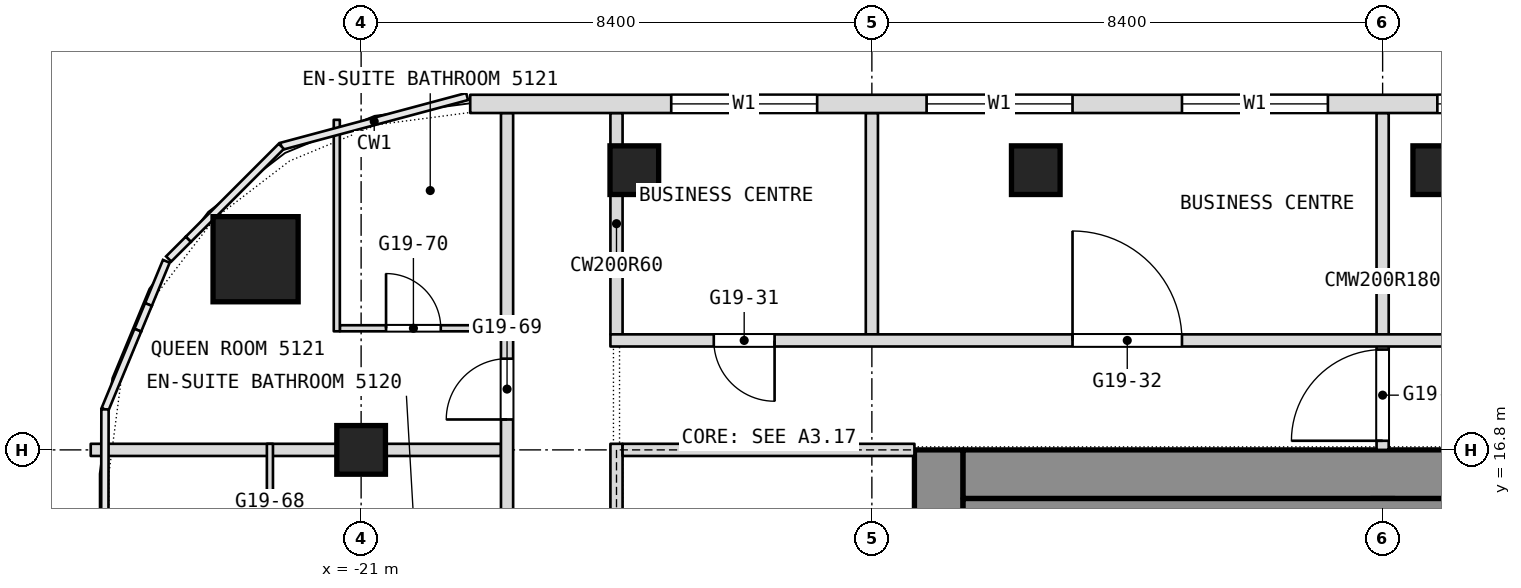
"""IFC4 building model, lengths in metres.
Left out: names, types, materials, properties, quantities, classifications, styles, units other than length and angle.
Written with IfcOpenShell. Run it as: python <this file> out.ifc"""

import sys

from ifc_helpers import new_model, si_unit, direction, frame, frame_2d, origin, origin_2d, place, context, subcontext, project, spatial, rectangle, extrude, element, fill, save


model = new_model("IFC4")
c1 = context("Model", 3, precision=1e-05, world=origin(), true_north=direction((0.0, 1.0)))
c2 = subcontext(c1, "Body", "Model", "MODEL_VIEW")
j1 = project(units=[si_unit("LENGTHUNIT", "METRE"), si_unit("PLANEANGLEUNIT", "RADIAN")], contexts=[c1])
p1 = place(None, origin())
s1 = spatial("IfcSite", under=j1, at=p1, CompositionType="ELEMENT")
p2 = place(p1, origin())
s2 = spatial("IfcBuilding", under=s1, at=p2, CompositionType="ELEMENT")
p3 = place(p2, frame((0.0, 0.0, 220.1)))
s3 = spatial("IfcBuildingStorey", under=s2, at=p3, CompositionType="ELEMENT", Elevation=220.1)
p4 = place(p3, frame((-11.5, 0.0, 0.0), z_axis=(0.0, 0.0, 1.0), x_axis=(0.0, 1.0, 0.0)))
e1 = element("IfcWall", 1, at=p4, inside=s3, PredefinedType="SHEAR", context=c2, shape_type="SweptSolid", body=[
    extrude(rectangle(XDim=16.8, YDim=0.8, at=frame_2d((8.4, 0.0))), origin(), (0.0, 0.0, 1.0), 3.6),
])
p5 = place(p4, frame((3.6, 0.0, 0.0)))
e2 = element("IfcOpeningElement", 2, at=p5, cuts=e1, PredefinedType="OPENING", context=c2, shape_type="SweptSolid", body=[
    extrude(rectangle(XDim=0.9, YDim=2.1, at=frame_2d((0.45, 1.05))), frame((0.0, 0.4, 0.0), z_axis=(0.0, -1.0, 0.0), x_axis=(1.0, 0.0, 0.0)), (0.0, 0.0, 1.0), 0.8),
])
p6 = place(p4, frame((6.825, 0.0, 0.0)))
e3 = element("IfcOpeningElement", 3, at=p6, cuts=e1, PredefinedType="OPENING", context=c2, shape_type="SweptSolid", body=[
    extrude(rectangle(XDim=1.2, YDim=2.1, at=frame_2d((0.6, 1.05))), frame((0.0, 0.4, 0.0), z_axis=(0.0, -1.0, 0.0), x_axis=(1.0, 0.0, 0.0)), (0.0, 0.0, 1.0), 0.8),
])
p7 = place(p4, frame((12.3, 0.0, 0.0)))
e4 = element("IfcOpeningElement", 4, at=p7, cuts=e1, PredefinedType="OPENING", context=c2, shape_type="SweptSolid", body=[
    extrude(rectangle(XDim=0.9, YDim=2.1, at=frame_2d((0.45, 1.05))), frame((0.0, 0.4, 0.0), z_axis=(0.0, -1.0, 0.0), x_axis=(1.0, 0.0, 0.0)), (0.0, 0.0, 1.0), 0.8),
])
p8 = place(p4, frame((8.775, 0.0, 0.0)))
e5 = element("IfcOpeningElement", 5, at=p8, cuts=e1, PredefinedType="OPENING", context=c2, shape_type="SweptSolid", body=[
    extrude(rectangle(XDim=1.2, YDim=2.1, at=frame_2d((0.6, 1.05))), frame((0.0, 0.4, 0.0), z_axis=(0.0, -1.0, 0.0), x_axis=(1.0, 0.0, 0.0)), (0.0, 0.0, 1.0), 0.8),
])
p9 = place(p3, frame((-11.1, 16.4, 0.0), z_axis=(0.0, 0.0, 1.0), x_axis=(1.0, 0.0, 0.0)))
e6 = element("IfcWall", 6, at=p9, inside=s3, PredefinedType="SHEAR", context=c2, shape_type="SweptSolid", body=[
    extrude(rectangle(XDim=22.2, YDim=0.8, at=frame_2d((11.1, 0.0))), origin(), (0.0, 0.0, 1.0), 3.6),
])
p10 = place(p3, frame((-4.2, 0.8, 0.0), z_axis=(0.0, 0.0, 1.0), x_axis=(0.0, 1.0, 0.0)))
e7 = element("IfcWall", 7, at=p10, inside=s3, PredefinedType="SHEAR", context=c2, shape_type="SweptSolid", body=[
    extrude(rectangle(XDim=15.2, YDim=0.4, at=frame_2d((7.6, 0.0))), origin(), (0.0, 0.0, 1.0), 3.6),
])
p11 = place(p10, frame((8.5, 0.0, 0.0)))
e8 = element("IfcOpeningElement", 8, at=p11, cuts=e7, PredefinedType="OPENING", context=c2, shape_type="SweptSolid", body=[
    extrude(rectangle(XDim=1.2, YDim=2.1, at=frame_2d((0.6, 1.05))), frame((0.0, 0.2, 0.0), z_axis=(0.0, -1.0, 0.0), x_axis=(1.0, 0.0, 0.0)), (0.0, 0.0, 1.0), 0.4),
])
p12 = place(p3, frame((-22.736, 19.936, 0.0), z_axis=(0.0, 0.0, 1.0), x_axis=(1.0, 0.0, 0.0)))
e9 = element("IfcColumn", 9, at=p12, inside=s3, PredefinedType="COLUMN", context=c2, shape_type="SweptSolid", body=[
    extrude(rectangle(XDim=1.4, YDim=1.4, at=origin_2d()), origin(), (0.0, 0.0, 1.0), 3.6),
])
for number, where, z_axis, x_axis in (
    (10, (-21.0, 16.8, 0.0), (0.0, 0.0, 1.0), (1.0, 0.0, 0.0)),
    (11, (-16.507, 21.4, 0.0), (0.0, 0.0, 1.0), (1.0, 0.0, 0.0)),
    (12, (-9.904, 21.4, 0.0), (0.0, 0.0, 1.0), (1.0, 0.0, 0.0)),
    (13, (-3.302, 21.4, 0.0), (0.0, 0.0, 1.0), (1.0, 0.0, 0.0)),
):
    element("IfcColumn", number, at=place(p3, frame(where, z_axis=z_axis, x_axis=x_axis)), inside=s3, PredefinedType="COLUMN", context=c2, shape_type="SweptSolid", body=[
        extrude(rectangle(XDim=0.8, YDim=0.8, at=origin_2d()), origin(), (0.0, 0.0, 1.0), 3.6),
    ])
p13 = place(p3, frame((-4.2, 16.8, 0.0), z_axis=(0.0, 0.0, 1.0), x_axis=(0.0, 1.0, 0.0)))
e14 = element("IfcWall", 14, at=p13, inside=s3, PredefinedType="PARTITIONING", context=c2, shape_type="SweptSolid", body=[
    extrude(rectangle(XDim=5.54, YDim=0.2, at=frame_2d((2.77, 0.0))), origin(), (0.0, 0.0, 1.0), 3.34),
])
p14 = place(p13, frame((0.15, 0.0, 0.0)))
e15 = element("IfcOpeningElement", 15, at=p14, cuts=e14, PredefinedType="OPENING", context=c2, shape_type="SweptSolid", body=[
    extrude(rectangle(XDim=1.5, YDim=2.1, at=frame_2d((0.75, 1.05))), frame((0.0, 0.1, 0.0), z_axis=(0.0, -1.0, 0.0), x_axis=(1.0, 0.0, 0.0)), (0.0, 0.0, 1.0), 0.2),
])
for number, where, z_axis, x_axis in (
    (16, (-12.6, 18.7, 0.0), (0.0, 0.0, 1.0), (0.0, 1.0, 0.0)),
    (17, (-16.8, 18.7, 0.0), (0.0, 0.0, 1.0), (0.0, 1.0, 0.0)),
):
    element("IfcWall", number, at=place(p3, frame(where, z_axis=z_axis, x_axis=x_axis)), inside=s3, PredefinedType="PARTITIONING", context=c2, shape_type="SweptSolid", body=[
        extrude(rectangle(XDim=3.64, YDim=0.2, at=frame_2d((1.82, 0.0))), origin(), (0.0, 0.0, 1.0), 3.34),
    ])
p15 = place(p3, frame((-25.447, 16.8, 0.0), z_axis=(0.0, 0.0, 1.0), x_axis=(1.0, 0.0, 0.0)))
e18 = element("IfcWall", 18, at=p15, inside=s3, PredefinedType="PARTITIONING", context=c2, shape_type="SweptSolid", body=[
    extrude(rectangle(XDim=6.747, YDim=0.2, at=frame_2d((3.374, 0.0))), origin(), (0.0, 0.0, 1.0), 2.94),
])
p16 = place(p3, frame((-18.6, -26.751, 0.0), z_axis=(0.0, 0.0, 1.0), x_axis=(0.0, 1.0, 0.0)))
e19 = element("IfcWall", 19, at=p16, inside=s3, PredefinedType="PARTITIONING", context=c2, shape_type="SweptSolid", body=[
    extrude(rectangle(XDim=49.091, YDim=0.2, at=frame_2d((24.545, 0.0))), origin(), (0.0, 0.0, 1.0), 3.34),
])
p17 = place(p16, frame((3.413, 0.0, 0.0)))
e20 = element("IfcOpeningElement", 20, at=p17, cuts=e19, PredefinedType="OPENING", context=c2, shape_type="SweptSolid", body=[
    extrude(rectangle(XDim=1.0, YDim=2.1, at=frame_2d((0.5, 1.05))), frame((0.0, 0.1, 0.0), z_axis=(0.0, -1.0, 0.0), x_axis=(1.0, 0.0, 0.0)), (0.0, 0.0, 1.0), 0.2),
])
p18 = place(p16, frame((5.838, 0.0, 0.0)))
e21 = element("IfcOpeningElement", 21, at=p18, cuts=e19, PredefinedType="OPENING", context=c2, shape_type="SweptSolid", body=[
    extrude(rectangle(XDim=1.0, YDim=2.1, at=frame_2d((0.5, 1.05))), frame((0.0, 0.1, 0.0), z_axis=(0.0, -1.0, 0.0), x_axis=(1.0, 0.0, 0.0)), (0.0, 0.0, 1.0), 0.2),
])
p19 = place(p16, frame((10.351, 0.0, 0.0)))
e22 = element("IfcOpeningElement", 22, at=p19, cuts=e19, PredefinedType="OPENING", context=c2, shape_type="SweptSolid", body=[
    extrude(rectangle(XDim=1.0, YDim=2.1, at=frame_2d((0.5, 1.05))), frame((0.0, 0.1, 0.0), z_axis=(0.0, -1.0, 0.0), x_axis=(1.0, 0.0, 0.0)), (0.0, 0.0, 1.0), 0.2),
])
p20 = place(p16, frame((16.951, 0.0, 0.0)))
e23 = element("IfcOpeningElement", 23, at=p20, cuts=e19, PredefinedType="OPENING", context=c2, shape_type="SweptSolid", body=[
    extrude(rectangle(XDim=1.0, YDim=2.1, at=frame_2d((0.5, 1.05))), frame((0.0, 0.1, 0.0), z_axis=(0.0, -1.0, 0.0), x_axis=(1.0, 0.0, 0.0)), (0.0, 0.0, 1.0), 0.2),
])
p21 = place(p16, frame((21.151, 0.0, 0.0)))
e24 = element("IfcOpeningElement", 24, at=p21, cuts=e19, PredefinedType="OPENING", context=c2, shape_type="SweptSolid", body=[
    extrude(rectangle(XDim=1.0, YDim=2.1, at=frame_2d((0.5, 1.05))), frame((0.0, 0.1, 0.0), z_axis=(0.0, -1.0, 0.0), x_axis=(1.0, 0.0, 0.0)), (0.0, 0.0, 1.0), 0.2),
])
p22 = place(p16, frame((22.951, 0.0, 0.0)))
e25 = element("IfcOpeningElement", 25, at=p22, cuts=e19, PredefinedType="OPENING", context=c2, shape_type="SweptSolid", body=[
    extrude(rectangle(XDim=1.0, YDim=2.1, at=frame_2d((0.5, 1.05))), frame((0.0, 0.1, 0.0), z_axis=(0.0, -1.0, 0.0), x_axis=(1.0, 0.0, 0.0)), (0.0, 0.0, 1.0), 0.2),
])
p23 = place(p16, frame((30.351, 0.0, 0.0)))
e26 = element("IfcOpeningElement", 26, at=p23, cuts=e19, PredefinedType="OPENING", context=c2, shape_type="SweptSolid", body=[
    extrude(rectangle(XDim=1.1, YDim=2.1, at=frame_2d((0.55, 1.05))), frame((0.0, 0.1, 0.0), z_axis=(0.0, -1.0, 0.0), x_axis=(1.0, 0.0, 0.0)), (0.0, 0.0, 1.0), 0.2),
])
p24 = place(p16, frame((37.951, 0.0, 0.0)))
e27 = element("IfcOpeningElement", 27, at=p24, cuts=e19, PredefinedType="OPENING", context=c2, shape_type="SweptSolid", body=[
    extrude(rectangle(XDim=1.0, YDim=2.1, at=frame_2d((0.5, 1.05))), frame((0.0, 0.1, 0.0), z_axis=(0.0, -1.0, 0.0), x_axis=(1.0, 0.0, 0.0)), (0.0, 0.0, 1.0), 0.2),
])
p25 = place(p16, frame((39.751, 0.0, 0.0)))
e28 = element("IfcOpeningElement", 28, at=p25, cuts=e19, PredefinedType="OPENING", context=c2, shape_type="SweptSolid", body=[
    extrude(rectangle(XDim=1.0, YDim=2.1, at=frame_2d((0.5, 1.05))), frame((0.0, 0.1, 0.0), z_axis=(0.0, -1.0, 0.0), x_axis=(1.0, 0.0, 0.0)), (0.0, 0.0, 1.0), 0.2),
])
p26 = place(p16, frame((44.051, 0.0, 0.0)))
e29 = element("IfcOpeningElement", 29, at=p26, cuts=e19, PredefinedType="OPENING", context=c2, shape_type="SweptSolid", body=[
    extrude(rectangle(XDim=1.0, YDim=2.1, at=frame_2d((0.5, 1.05))), frame((0.0, 0.1, 0.0), z_axis=(0.0, -1.0, 0.0), x_axis=(1.0, 0.0, 0.0)), (0.0, 0.0, 1.0), 0.2),
])
p27 = place(p3, frame((-16.9, 18.6, 0.0), z_axis=(0.0, 0.0, 1.0), x_axis=(1.0, 0.0, 0.0)))
e30 = element("IfcWall", 30, at=p27, inside=s3, PredefinedType="PARTITIONING", context=c2, shape_type="SweptSolid", body=[
    extrude(rectangle(XDim=33.8, YDim=0.2, at=frame_2d((16.9, 0.0))), origin(), (0.0, 0.0, 1.0), 3.34),
])
p28 = place(p27, frame((1.7, 0.0, 0.0)))
e31 = element("IfcOpeningElement", 31, at=p28, cuts=e30, PredefinedType="OPENING", context=c2, shape_type="SweptSolid", body=[
    extrude(rectangle(XDim=1.0, YDim=2.1, at=frame_2d((0.5, 1.05))), frame((0.0, 0.1, 0.0), z_axis=(0.0, -1.0, 0.0), x_axis=(1.0, 0.0, 0.0)), (0.0, 0.0, 1.0), 0.2),
])
p29 = place(p27, frame((7.6, 0.0, 0.0)))
e32 = element("IfcOpeningElement", 32, at=p29, cuts=e30, PredefinedType="OPENING", context=c2, shape_type="SweptSolid", body=[
    extrude(rectangle(XDim=1.8, YDim=2.1, at=frame_2d((0.9, 1.05))), frame((0.0, 0.1, 0.0), z_axis=(0.0, -1.0, 0.0), x_axis=(1.0, 0.0, 0.0)), (0.0, 0.0, 1.0), 0.2),
])
p30 = place(p27, frame((16.0, 0.0, 0.0)))
e33 = element("IfcOpeningElement", 33, at=p30, cuts=e30, PredefinedType="OPENING", context=c2, shape_type="SweptSolid", body=[
    extrude(rectangle(XDim=1.8, YDim=2.1, at=frame_2d((0.9, 1.05))), frame((0.0, 0.1, 0.0), z_axis=(0.0, -1.0, 0.0), x_axis=(1.0, 0.0, 0.0)), (0.0, 0.0, 1.0), 0.2),
])
p31 = place(p27, frame((24.4, 0.0, 0.0)))
e34 = element("IfcOpeningElement", 34, at=p31, cuts=e30, PredefinedType="OPENING", context=c2, shape_type="SweptSolid", body=[
    extrude(rectangle(XDim=1.8, YDim=2.1, at=frame_2d((0.9, 1.05))), frame((0.0, 0.1, 0.0), z_axis=(0.0, -1.0, 0.0), x_axis=(1.0, 0.0, 0.0)), (0.0, 0.0, 1.0), 0.2),
])
p32 = place(p27, frame((31.1, 0.0, 0.0)))
e35 = element("IfcOpeningElement", 35, at=p32, cuts=e30, PredefinedType="OPENING", context=c2, shape_type="SweptSolid", body=[
    extrude(rectangle(XDim=1.0, YDim=2.1, at=frame_2d((0.5, 1.05))), frame((0.0, 0.1, 0.0), z_axis=(0.0, -1.0, 0.0), x_axis=(1.0, 0.0, 0.0)), (0.0, 0.0, 1.0), 0.2),
])
p33 = place(p3, frame((-21.35, 18.8, 0.0), z_axis=(0.0, 0.0, 1.0), x_axis=(1.0, 0.0, 0.0)))
e36 = element("IfcWall", 36, at=p33, inside=s3, PredefinedType="PARTITIONING", context=c2, shape_type="SweptSolid", body=[
    extrude(rectangle(XDim=2.65, YDim=0.1, at=frame_2d((1.325, 0.0))), origin(), (0.0, 0.0, 1.0), 3.34),
])
p34 = place(p33, frame((0.76, 0.0, 0.0)))
e37 = element("IfcOpeningElement", 37, at=p34, cuts=e36, PredefinedType="OPENING", context=c2, shape_type="SweptSolid", body=[
    extrude(rectangle(XDim=0.9, YDim=2.1, at=frame_2d((0.45, 1.05))), frame((0.0, 0.05, 0.0), z_axis=(0.0, -1.0, 0.0), x_axis=(1.0, 0.0, 0.0)), (0.0, 0.0, 1.0), 0.1),
])
p35 = place(p3, frame((-21.4, 18.75, 0.0), z_axis=(0.0, 0.0, 1.0), x_axis=(0.0, 1.0, 0.0)))
e38 = element("IfcWall", 38, at=p35, inside=s3, PredefinedType="PARTITIONING", context=c2, shape_type="SweptSolid", body=[
    extrude(rectangle(XDim=3.478, YDim=0.1, at=frame_2d((1.739, 0.0))), origin(), (0.0, 0.0, 1.0), 3.34),
])
p36 = place(p3, frame((-22.5, 14.35, 0.0), z_axis=(0.0, 0.0, 1.0), x_axis=(0.0, 1.0, 0.0)))
e39 = element("IfcWall", 39, at=p36, inside=s3, PredefinedType="PARTITIONING", context=c2, shape_type="SweptSolid", body=[
    extrude(rectangle(XDim=2.55, YDim=0.1, at=frame_2d((1.275, 0.0))), origin(), (0.0, 0.0, 1.0), 3.34),
])
p37 = place(p36, frame((0.15, 0.0, 0.0)))
e40 = element("IfcOpeningElement", 40, at=p37, cuts=e39, PredefinedType="OPENING", context=c2, shape_type="SweptSolid", body=[
    extrude(rectangle(XDim=0.9, YDim=2.1, at=frame_2d((0.45, 1.05))), frame((0.0, 0.05, 0.0), z_axis=(0.0, -1.0, 0.0), x_axis=(1.0, 0.0, 0.0)), (0.0, 0.0, 1.0), 0.1),
])
p38 = place(p3, frame((19.206, 22.49, 0.0), z_axis=(0.0, 0.0, 1.0), x_axis=(-1.0, 0.0, 0.0)))
e41 = element("IfcWall", 41, at=p38, inside=s3, PredefinedType="NOTDEFINED", context=c2, shape_type="SweptSolid", body=[
    extrude(rectangle(XDim=38.412, YDim=0.3, at=frame_2d((19.206, 0.0))), origin(), (0.0, 0.0, 1.0), 3.6),
])
p39 = place(p38, frame((3.306, 0.0, 0.9)))
e42 = element("IfcOpeningElement", 42, at=p39, cuts=e41, PredefinedType="OPENING", context=c2, shape_type="SweptSolid", body=[
    extrude(rectangle(XDim=2.4, YDim=2.1, at=frame_2d((1.2, 1.05))), frame((0.0, 0.15, 0.0), z_axis=(0.0, -1.0, 0.0), x_axis=(1.0, 0.0, 0.0)), (0.0, 0.0, 1.0), 0.3),
])
p40 = place(p38, frame((7.506, 0.0, 0.9)))
e43 = element("IfcOpeningElement", 43, at=p40, cuts=e41, PredefinedType="OPENING", context=c2, shape_type="SweptSolid", body=[
    extrude(rectangle(XDim=2.4, YDim=2.1, at=frame_2d((1.2, 1.05))), frame((0.0, 0.15, 0.0), z_axis=(0.0, -1.0, 0.0), x_axis=(1.0, 0.0, 0.0)), (0.0, 0.0, 1.0), 0.3),
])
p41 = place(p38, frame((11.706, 0.0, 0.9)))
e44 = element("IfcOpeningElement", 44, at=p41, cuts=e41, PredefinedType="OPENING", context=c2, shape_type="SweptSolid", body=[
    extrude(rectangle(XDim=2.4, YDim=2.1, at=frame_2d((1.2, 1.05))), frame((0.0, 0.15, 0.0), z_axis=(0.0, -1.0, 0.0), x_axis=(1.0, 0.0, 0.0)), (0.0, 0.0, 1.0), 0.3),
])
p42 = place(p38, frame((15.906, 0.0, 0.9)))
e45 = element("IfcOpeningElement", 45, at=p42, cuts=e41, PredefinedType="OPENING", context=c2, shape_type="SweptSolid", body=[
    extrude(rectangle(XDim=2.4, YDim=2.1, at=frame_2d((1.2, 1.05))), frame((0.0, 0.15, 0.0), z_axis=(0.0, -1.0, 0.0), x_axis=(1.0, 0.0, 0.0)), (0.0, 0.0, 1.0), 0.3),
])
p43 = place(p38, frame((20.106, 0.0, 0.9)))
e46 = element("IfcOpeningElement", 46, at=p43, cuts=e41, PredefinedType="OPENING", context=c2, shape_type="SweptSolid", body=[
    extrude(rectangle(XDim=2.4, YDim=2.1, at=frame_2d((1.2, 1.05))), frame((0.0, 0.15, 0.0), z_axis=(0.0, -1.0, 0.0), x_axis=(1.0, 0.0, 0.0)), (0.0, 0.0, 1.0), 0.3),
])
p44 = place(p38, frame((24.306, 0.0, 0.9)))
e47 = element("IfcOpeningElement", 47, at=p44, cuts=e41, PredefinedType="OPENING", context=c2, shape_type="SweptSolid", body=[
    extrude(rectangle(XDim=2.4, YDim=2.1, at=frame_2d((1.2, 1.05))), frame((0.0, 0.15, 0.0), z_axis=(0.0, -1.0, 0.0), x_axis=(1.0, 0.0, 0.0)), (0.0, 0.0, 1.0), 0.3),
])
p45 = place(p38, frame((28.506, 0.0, 0.9)))
e48 = element("IfcOpeningElement", 48, at=p45, cuts=e41, PredefinedType="OPENING", context=c2, shape_type="SweptSolid", body=[
    extrude(rectangle(XDim=2.4, YDim=2.1, at=frame_2d((1.2, 1.05))), frame((0.0, 0.15, 0.0), z_axis=(0.0, -1.0, 0.0), x_axis=(1.0, 0.0, 0.0)), (0.0, 0.0, 1.0), 0.3),
])
p46 = place(p38, frame((32.706, 0.0, 0.9)))
e49 = element("IfcOpeningElement", 49, at=p46, cuts=e41, PredefinedType="OPENING", context=c2, shape_type="SweptSolid", body=[
    extrude(rectangle(XDim=2.4, YDim=2.1, at=frame_2d((1.2, 1.05))), frame((0.0, 0.15, 0.0), z_axis=(0.0, -1.0, 0.0), x_axis=(1.0, 0.0, 0.0)), (0.0, 0.0, 1.0), 0.3),
])
p47 = place(p3, frame((-11.1, 15.65, 0.0), z_axis=(0.0, 0.0, 1.0), x_axis=(1.0, 0.0, 0.0)))
e50 = element("IfcWall", 50, at=p47, inside=s3, PredefinedType="PARTITIONING", context=c2, shape_type="SweptSolid", body=[
    extrude(rectangle(XDim=22.2, YDim=0.7, at=frame_2d((11.1, 0.0))), origin(), (0.0, 0.0, 1.0), 3.34),
])
p48 = place(p3, frame((-16.8, -0.1, 0.0), z_axis=(0.0, 0.0, 1.0), x_axis=(0.0, 1.0, 0.0)))
e51 = element("IfcWall", 51, at=p48, inside=s3, PredefinedType="PARTITIONING", context=c2, shape_type="SweptSolid", body=[
    extrude(rectangle(XDim=17.0, YDim=0.2, at=frame_2d((8.5, 0.0))), origin(), (0.0, 0.0, 1.0), 3.34),
])
p49 = place(p48, frame((2.2, 0.0, 0.0)))
e52 = element("IfcOpeningElement", 52, at=p49, cuts=e51, PredefinedType="OPENING", context=c2, shape_type="SweptSolid", body=[
    extrude(rectangle(XDim=1.8, YDim=2.1, at=frame_2d((0.9, 1.05))), frame((0.0, 0.1, 0.0), z_axis=(0.0, -1.0, 0.0), x_axis=(1.0, 0.0, 0.0)), (0.0, 0.0, 1.0), 0.2),
])
p50 = place(p48, frame((13.0, 0.0, 0.0)))
e53 = element("IfcOpeningElement", 53, at=p50, cuts=e51, PredefinedType="OPENING", context=c2, shape_type="SweptSolid", body=[
    extrude(rectangle(XDim=1.8, YDim=2.1, at=frame_2d((0.9, 1.05))), frame((0.0, 0.1, 0.0), z_axis=(0.0, -1.0, 0.0), x_axis=(1.0, 0.0, 0.0)), (0.0, 0.0, 1.0), 0.2),
])
p51 = place(p3, frame((-16.7, 16.8, 0.0), z_axis=(0.0, 0.0, 1.0), x_axis=(1.0, 0.0, 0.0)))
e54 = element("IfcWall", 54, at=p51, inside=s3, PredefinedType="PARTITIONING", context=c2, shape_type="SweptSolid", body=[
    extrude(rectangle(XDim=4.8, YDim=0.2, at=frame_2d((2.4, 0.0))), origin(), (0.0, 0.0, 1.0), 2.94),
])
p52 = place(p26, origin())
e55 = element("IfcDoor", 55, at=p52, inside=s3, OperationType="SINGLE_SWING_RIGHT", PredefinedType="DOOR", context=c2, shape_type="SweptSolid", body=[
    extrude(rectangle(XDim=1.0, YDim=2.1, at=frame_2d((0.5, 1.05))), frame((0.0, 0.025, 0.0), z_axis=(0.0, -1.0, 0.0), x_axis=(1.0, 0.0, 0.0)), (0.0, 0.0, 1.0), 0.05),
])
fill(e29, e55)
p53 = place(p28, origin())
e56 = element("IfcDoor", 56, at=p53, inside=s3, OperationType="SINGLE_SWING_LEFT", PredefinedType="DOOR", context=c2, shape_type="SweptSolid", body=[
    extrude(rectangle(XDim=1.0, YDim=2.1, at=frame_2d((0.5, 1.05))), frame((0.0, 0.025, 0.0), z_axis=(0.0, -1.0, 0.0), x_axis=(1.0, 0.0, 0.0)), (0.0, 0.0, 1.0), 0.05),
])
fill(e31, e56)
p54 = place(p29, origin())
e57 = element("IfcDoor", 57, at=p54, inside=s3, OperationType="DOUBLE_DOOR_SINGLE_SWING", PredefinedType="DOOR", context=c2, shape_type="SweptSolid", body=[
    extrude(rectangle(XDim=1.8, YDim=2.1, at=frame_2d((0.9, 1.05))), frame((0.0, 0.025, 0.0), z_axis=(0.0, -1.0, 0.0), x_axis=(1.0, 0.0, 0.0)), (0.0, 0.0, 1.0), 0.05),
])
fill(e32, e57)
p55 = place(p34, origin())
e58 = element("IfcDoor", 58, at=p55, inside=s3, OperationType="SINGLE_SWING_LEFT", PredefinedType="DOOR", context=c2, shape_type="SweptSolid", body=[
    extrude(rectangle(XDim=0.9, YDim=2.1, at=frame_2d((0.45, 1.05))), frame((0.0, 0.025, 0.0), z_axis=(0.0, -1.0, 0.0), x_axis=(1.0, 0.0, 0.0)), (0.0, 0.0, 1.0), 0.05),
])
fill(e37, e58)
p56 = place(p43, origin())
e59 = element("IfcWindow", 59, at=p56, inside=s3, PartitioningType="SINGLE_PANEL", PredefinedType="WINDOW", context=c2, shape_type="SweptSolid", body=[
    extrude(rectangle(XDim=2.4, YDim=2.1, at=frame_2d((1.2, 1.05))), frame((0.0, 0.03, 0.0), z_axis=(0.0, -1.0, 0.0), x_axis=(1.0, 0.0, 0.0)), (0.0, 0.0, 1.0), 0.06),
])
fill(e46, e59)
p57 = place(p44, origin())
e60 = element("IfcWindow", 60, at=p57, inside=s3, PartitioningType="SINGLE_PANEL", PredefinedType="WINDOW", context=c2, shape_type="SweptSolid", body=[
    extrude(rectangle(XDim=2.4, YDim=2.1, at=frame_2d((1.2, 1.05))), frame((0.0, 0.03, 0.0), z_axis=(0.0, -1.0, 0.0), x_axis=(1.0, 0.0, 0.0)), (0.0, 0.0, 1.0), 0.06),
])
fill(e47, e60)
p58 = place(p45, origin())
e61 = element("IfcWindow", 61, at=p58, inside=s3, PartitioningType="SINGLE_PANEL", PredefinedType="WINDOW", context=c2, shape_type="SweptSolid", body=[
    extrude(rectangle(XDim=2.4, YDim=2.1, at=frame_2d((1.2, 1.05))), frame((0.0, 0.03, 0.0), z_axis=(0.0, -1.0, 0.0), x_axis=(1.0, 0.0, 0.0)), (0.0, 0.0, 1.0), 0.06),
])
fill(e48, e61)
p59 = place(p46, origin())
e62 = element("IfcWindow", 62, at=p59, inside=s3, PartitioningType="SINGLE_PANEL", PredefinedType="WINDOW", context=c2, shape_type="SweptSolid", body=[
    extrude(rectangle(XDim=2.4, YDim=2.1, at=frame_2d((1.2, 1.05))), frame((0.0, 0.03, 0.0), z_axis=(0.0, -1.0, 0.0), x_axis=(1.0, 0.0, 0.0)), (0.0, 0.0, 1.0), 0.06),
])
fill(e49, e62)
p60 = place(p14, origin())
e63 = element("IfcDoor", 63, at=p60, inside=s3, OperationType="DOUBLE_DOOR_DOUBLE_SWING", PredefinedType="DOOR", context=c2, shape_type="SweptSolid", body=[
    extrude(rectangle(XDim=1.5, YDim=2.1, at=frame_2d((0.75, 1.05))), frame((0.0, 0.025, 0.0), z_axis=(0.0, -1.0, 0.0), x_axis=(1.0, 0.0, 0.0)), (0.0, 0.0, 1.0), 0.05),
])
fill(e15, e63)
save(model, sys.argv[1])
